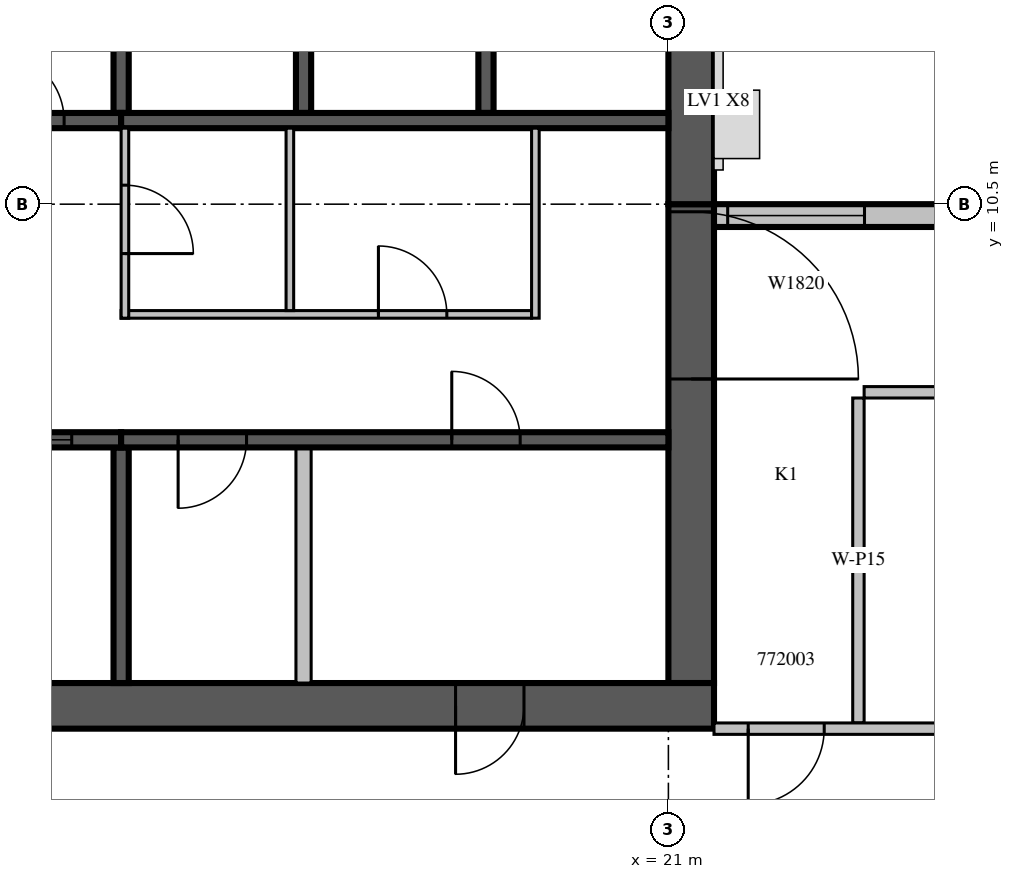
"""IFC4 building model, lengths in metres.
Left out: names, types, materials, properties, quantities, classifications, styles, units other than length and angle.
Written with IfcOpenShell. Run it as: python <this file> out.ifc"""

import sys

from ifc_helpers import new_model, si_unit, direction, frame, frame_2d, origin, place, context, subcontext, project, spatial, rectangle, extrude, source, transform, mapped, element, fill, save


model = new_model("IFC4")
c1 = context("Model", 3, precision=1e-05, world=origin(), true_north=direction((0.0, 1.0)))
c2 = subcontext(c1, "Body", "Model", "MODEL_VIEW")
j1 = project(units=[si_unit("LENGTHUNIT", "METRE"), si_unit("PLANEANGLEUNIT", "RADIAN")], contexts=[c1])
p1 = place(None, origin())
s1 = spatial("IfcSite", under=j1, at=p1, CompositionType="ELEMENT")
p2 = place(p1, origin())
s2 = spatial("IfcBuilding", under=s1, at=p2, CompositionType="ELEMENT")
p3 = place(p2, frame((0.0, 0.0, 312.5)))
s3 = spatial("IfcBuildingStorey", under=s2, at=p3, CompositionType="ELEMENT", Elevation=312.5)
m1 = source(origin(), c2, "Body", "SweptSolid", [
    extrude(rectangle(XDim=6.3, YDim=0.6, at=frame_2d((3.15, 0.0))), origin(), (0.0, 0.0, 1.0), 3.5),
])
p4 = place(p3, frame((21.3, 4.2, 0.0), z_axis=(0.0, 0.0, 1.0), x_axis=(0.0, 1.0, 0.0)))
e1 = element("IfcWall", 1, at=p4, inside=s3, PredefinedType="SHEAR", context=c2, shape_type="MappedRepresentation", body=[
    mapped(m1, transform((0.0, 0.0, 0.0), scale=1.0)),
])
m2 = source(origin(), c2, "Body", "SweptSolid", [
    extrude(rectangle(XDim=2.2, YDim=2.1, at=frame_2d((1.1, 1.05))), frame((0.0, 0.31, 0.0), z_axis=(0.0, -1.0, 0.0), x_axis=(1.0, 0.0, 0.0)), (0.0, 0.0, 1.0), 0.62),
])
p5 = place(p4, frame((4.0, 0.0, 0.0)))
e2 = element("IfcOpeningElement", 2, at=p5, cuts=e1, PredefinedType="OPENING", context=c2, shape_type="MappedRepresentation", body=[
    mapped(m2, transform((0.0, 0.0, 0.0), scale=1.0)),
])
m3 = source(origin(), c2, "Body", "SweptSolid", [
    extrude(rectangle(XDim=17.4, YDim=0.6, at=frame_2d((8.7, 0.0))), origin(), (0.0, 0.0, 1.0), 3.5),
])
p6 = place(p3, frame((4.2, 3.9, 0.0), z_axis=(0.0, 0.0, 1.0), x_axis=(1.0, 0.0, 0.0)))
e3 = element("IfcWall", 3, at=p6, inside=s3, PredefinedType="SHEAR", context=c2, shape_type="MappedRepresentation", body=[
    mapped(m3, transform((0.0, 0.0, 0.0), scale=1.0)),
])
m4 = source(origin(), c2, "Body", "SweptSolid", [
    extrude(rectangle(XDim=0.9, YDim=2.1, at=frame_2d((0.45, 1.05))), frame((0.0, 0.31, 0.0), z_axis=(0.0, -1.0, 0.0), x_axis=(1.0, 0.0, 0.0)), (0.0, 0.0, 1.0), 0.62),
])
p7 = place(p6, frame((14.0, 0.0, 0.0)))
e4 = element("IfcOpeningElement", 4, at=p7, cuts=e3, PredefinedType="OPENING", context=c2, shape_type="MappedRepresentation", body=[
    mapped(m4, transform((0.0, 0.0, 0.0), scale=1.0)),
])
m5 = source(origin(), c2, "Body", "SweptSolid", [
    extrude(rectangle(XDim=10.5, YDim=0.6, at=frame_2d((5.25, 0.0))), origin(), (0.0, 0.0, 1.0), 3.5),
])
p8 = place(p3, frame((21.3, 10.5, 0.0), z_axis=(0.0, 0.0, 1.0), x_axis=(0.0, 1.0, 0.0)))
e5 = element("IfcWall", 5, at=p8, inside=s3, PredefinedType="SHEAR", context=c2, shape_type="MappedRepresentation", body=[
    mapped(m5, transform((0.0, 0.0, 0.0), scale=1.0)),
])
m6 = source(origin(), c2, "Body", "SweptSolid", [
    extrude(rectangle(XDim=1.2, YDim=2.4, at=frame_2d((0.6, 1.2))), frame((0.0, 0.31, 0.0), z_axis=(0.0, -1.0, 0.0), x_axis=(1.0, 0.0, 0.0)), (0.0, 0.0, 1.0), 0.62),
])
p9 = place(p8, frame((5.7, 0.0, 0.6)))
e6 = element("IfcOpeningElement", 6, at=p9, cuts=e5, PredefinedType="OPENING", context=c2, shape_type="MappedRepresentation", body=[
    mapped(m6, transform((0.0, 0.0, 0.0), scale=1.0)),
])
m7 = source(origin(), c2, "Body", "SweptSolid", [
    extrude(rectangle(XDim=7.45, YDim=0.3, at=frame_2d((3.725, 0.0))), origin(), (0.0, 0.0, 1.0), 3.1),
])
p10 = place(p3, frame((29.05, 10.35, 0.0), z_axis=(0.0, 0.0, 1.0), x_axis=(-1.0, 0.0, 0.0)))
e7 = element("IfcWall", 7, at=p10, inside=s3, PredefinedType="STANDARD", context=c2, shape_type="MappedRepresentation", body=[
    mapped(m7, transform((0.0, 0.0, 0.0), scale=1.0)),
])
m8 = source(origin(), c2, "Body", "SweptSolid", [
    extrude(rectangle(XDim=3.0, YDim=2.0, at=frame_2d((1.5, 1.0))), frame((0.0, 0.16, 0.0), z_axis=(0.0, -1.0, 0.0), x_axis=(1.0, 0.0, 0.0)), (0.0, 0.0, 1.0), 0.32),
])
p11 = place(p10, frame((1.09, 0.0, 0.6)))
e8 = element("IfcOpeningElement", 8, at=p11, cuts=e7, PredefinedType="OPENING", context=c2, shape_type="MappedRepresentation", body=[
    mapped(m8, transform((0.0, 0.0, 0.0), scale=1.0)),
])
m9 = source(origin(), c2, "Body", "SweptSolid", [
    extrude(rectangle(XDim=1.8, YDim=2.0, at=frame_2d((0.9, 1.0))), frame((0.0, 0.16, 0.0), z_axis=(0.0, -1.0, 0.0), x_axis=(1.0, 0.0, 0.0)), (0.0, 0.0, 1.0), 0.32),
])
p12 = place(p10, frame((5.47, 0.0, 0.6)))
e9 = element("IfcOpeningElement", 9, at=p12, cuts=e7, PredefinedType="OPENING", context=c2, shape_type="MappedRepresentation", body=[
    mapped(m9, transform((0.0, 0.0, 0.0), scale=1.0)),
])
m10 = source(origin(), c2, "Body", "SweptSolid", [
    extrude(rectangle(XDim=3.1, YDim=0.2, at=frame_2d((1.55, 0.0))), origin(), (0.0, 0.0, 1.0), 3.1),
])
p13 = place(p3, frame((13.8, 4.2, 0.0), z_axis=(0.0, 0.0, 1.0), x_axis=(0.0, 1.0, 0.0)))
e10 = element("IfcWall", 10, at=p13, inside=s3, PredefinedType="SOLIDWALL", context=c2, shape_type="MappedRepresentation", body=[
    mapped(m10, transform((0.0, 0.0, 0.0), scale=1.0)),
])
m11 = source(origin(), c2, "Body", "SweptSolid", [
    extrude(rectangle(XDim=3.1, YDim=0.2, at=frame_2d((1.55, 0.0))), origin(), (0.0, 0.0, 1.0), 3.1),
])
p14 = place(p3, frame((16.2, 4.2, 0.0), z_axis=(0.0, 0.0, 1.0), x_axis=(0.0, 1.0, 0.0)))
e11 = element("IfcWall", 11, at=p14, inside=s3, PredefinedType="PARTITIONING", context=c2, shape_type="MappedRepresentation", body=[
    mapped(m11, transform((0.0, 0.0, 0.0), scale=1.0)),
])
m12 = source(origin(), c2, "Body", "SweptSolid", [
    extrude(rectangle(XDim=3.0, YDim=0.2, at=frame_2d((1.5, 0.0))), origin(), (0.0, 0.0, 1.0), 3.1),
])
p15 = place(p3, frame((13.8, 11.7, 0.0), z_axis=(0.0, 0.0, 1.0), x_axis=(0.0, 1.0, 0.0)))
e12 = element("IfcWall", 12, at=p15, inside=s3, PredefinedType="SOLIDWALL", context=c2, shape_type="MappedRepresentation", body=[
    mapped(m12, transform((0.0, 0.0, 0.0), scale=1.0)),
])
m13 = source(origin(), c2, "Body", "SweptSolid", [
    extrude(rectangle(XDim=3.0, YDim=0.2, at=frame_2d((1.5, 0.0))), origin(), (0.0, 0.0, 1.0), 3.5),
])
for number, where, z_axis, x_axis in (
    (13, (16.2, 11.7, 0.0), (0.0, 0.0, 1.0), (0.0, 1.0, 0.0)),
    (14, (18.6, 11.7, 0.0), (0.0, 0.0, 1.0), (0.0, 1.0, 0.0)),
):
    element("IfcWall", number, at=place(p3, frame(where, z_axis=z_axis, x_axis=x_axis)), inside=s3, PredefinedType="SOLIDWALL", context=c2, shape_type="MappedRepresentation", body=[
        mapped(m13, transform((0.0, 0.0, 0.0), scale=1.0)),
    ])
m14 = source(origin(), c2, "Body", "SweptSolid", [
    extrude(rectangle(XDim=9.6, YDim=0.2, at=frame_2d((4.8, 0.0))), origin(), (0.0, 0.0, 1.0), 3.5),
])
p16 = place(p3, frame((4.2, 7.4, 0.0), z_axis=(0.0, 0.0, 1.0), x_axis=(1.0, 0.0, 0.0)))
e15 = element("IfcWall", 15, at=p16, inside=s3, PredefinedType="SOLIDWALL", context=c2, shape_type="MappedRepresentation", body=[
    mapped(m14, transform((0.0, 0.0, 0.0), scale=1.0)),
])
m15 = source(origin(), c2, "Body", "SweptSolid", [
    extrude(rectangle(XDim=1.1, YDim=2.1, at=frame_2d((0.55, 1.05))), frame((0.0, 0.11, 0.0), z_axis=(0.0, -1.0, 0.0), x_axis=(1.0, 0.0, 0.0)), (0.0, 0.0, 1.0), 0.22),
])
p17 = place(p16, frame((0.65, 0.0, 0.0)))
e16 = element("IfcOpeningElement", 16, at=p17, cuts=e15, PredefinedType="OPENING", context=c2, shape_type="MappedRepresentation", body=[
    mapped(m15, transform((0.0, 0.0, 0.0), scale=1.0)),
])
p18 = place(p16, frame((3.05, 0.0, 0.0)))
e17 = element("IfcOpeningElement", 17, at=p18, cuts=e15, PredefinedType="OPENING", context=c2, shape_type="MappedRepresentation", body=[
    mapped(m15, transform((0.0, 0.0, 0.0), scale=1.0)),
])
p19 = place(p16, frame((5.45, 0.0, 0.0)))
e18 = element("IfcOpeningElement", 18, at=p19, cuts=e15, PredefinedType="OPENING", context=c2, shape_type="MappedRepresentation", body=[
    mapped(m15, transform((0.0, 0.0, 0.0), scale=1.0)),
])
p20 = place(p16, frame((7.85, 0.0, 0.0)))
e19 = element("IfcOpeningElement", 19, at=p20, cuts=e15, PredefinedType="OPENING", context=c2, shape_type="MappedRepresentation", body=[
    mapped(m15, transform((0.0, 0.0, 0.0), scale=1.0)),
])
m16 = source(origin(), c2, "Body", "SweptSolid", [
    extrude(rectangle(XDim=7.2, YDim=0.2, at=frame_2d((3.6, 0.0))), origin(), (0.0, 0.0, 1.0), 3.1),
])
p21 = place(p3, frame((13.8, 7.4, 0.0), z_axis=(0.0, 0.0, 1.0), x_axis=(1.0, 0.0, 0.0)))
e20 = element("IfcWall", 20, at=p21, inside=s3, PredefinedType="SOLIDWALL", context=c2, shape_type="MappedRepresentation", body=[
    mapped(m16, transform((0.0, 0.0, 0.0), scale=1.0)),
])
m17 = source(origin(), c2, "Body", "SweptSolid", [
    extrude(rectangle(XDim=0.9, YDim=2.1, at=frame_2d((0.45, 1.05))), frame((0.0, 0.11, 0.0), z_axis=(0.0, -1.0, 0.0), x_axis=(1.0, 0.0, 0.0)), (0.0, 0.0, 1.0), 0.22),
])
p22 = place(p21, frame((0.75, 0.0, 0.0)))
e21 = element("IfcOpeningElement", 21, at=p22, cuts=e20, PredefinedType="OPENING", context=c2, shape_type="MappedRepresentation", body=[
    mapped(m17, transform((0.0, 0.0, 0.0), scale=1.0)),
])
p23 = place(p21, frame((4.35, 0.0, 0.0)))
e22 = element("IfcOpeningElement", 22, at=p23, cuts=e20, PredefinedType="OPENING", context=c2, shape_type="MappedRepresentation", body=[
    mapped(m17, transform((0.0, 0.0, 0.0), scale=1.0)),
])
m18 = source(origin(), c2, "Body", "SweptSolid", [
    extrude(rectangle(XDim=4.8, YDim=0.2, at=frame_2d((2.4, 0.0))), origin(), (0.0, 0.0, 1.0), 3.1),
])
p24 = place(p3, frame((9.0, 11.6, 0.0), z_axis=(0.0, 0.0, 1.0), x_axis=(1.0, 0.0, 0.0)))
e23 = element("IfcWall", 23, at=p24, inside=s3, PredefinedType="SOLIDWALL", context=c2, shape_type="MappedRepresentation", body=[
    mapped(m18, transform((0.0, 0.0, 0.0), scale=1.0)),
])
p25 = place(p24, frame((0.75, 0.0, 0.0)))
e24 = element("IfcOpeningElement", 24, at=p25, cuts=e23, PredefinedType="OPENING", context=c2, shape_type="MappedRepresentation", body=[
    mapped(m17, transform((0.0, 0.0, 0.0), scale=1.0)),
])
p26 = place(p24, frame((3.15, 0.0, 0.0)))
e25 = element("IfcOpeningElement", 25, at=p26, cuts=e23, PredefinedType="OPENING", context=c2, shape_type="MappedRepresentation", body=[
    mapped(m17, transform((0.0, 0.0, 0.0), scale=1.0)),
])
m19 = source(origin(), c2, "Body", "SweptSolid", [
    extrude(rectangle(XDim=7.2, YDim=0.2, at=frame_2d((3.6, 0.0))), origin(), (0.0, 0.0, 1.0), 3.5),
])
p27 = place(p3, frame((13.8, 11.6, 0.0), z_axis=(0.0, 0.0, 1.0), x_axis=(1.0, 0.0, 0.0)))
e26 = element("IfcWall", 26, at=p27, inside=s3, PredefinedType="SOLIDWALL", context=c2, shape_type="MappedRepresentation", body=[
    mapped(m19, transform((0.0, 0.0, 0.0), scale=1.0)),
])
m20 = source(origin(), c2, "Body", "SweptSolid", [
    extrude(rectangle(XDim=5.4, YDim=0.1, at=frame_2d((2.7, 0.0))), origin(), (0.0, 0.0, 1.0), 3.1),
])
p28 = place(p3, frame((13.8, 9.05, 0.0), z_axis=(0.0, 0.0, 1.0), x_axis=(1.0, 0.0, 0.0)))
e27 = element("IfcWall", 27, at=p28, inside=s3, PredefinedType="PARTITIONING", context=c2, shape_type="MappedRepresentation", body=[
    mapped(m20, transform((0.0, 0.0, 0.0), scale=1.0)),
])
m21 = source(origin(), c2, "Body", "SweptSolid", [
    extrude(rectangle(XDim=0.9, YDim=2.1, at=frame_2d((0.45, 1.05))), frame((0.0, 0.06, 0.0), z_axis=(0.0, -1.0, 0.0), x_axis=(1.0, 0.0, 0.0)), (0.0, 0.0, 1.0), 0.12),
])
p29 = place(p28, frame((3.385, 0.0, 0.0)))
e28 = element("IfcOpeningElement", 28, at=p29, cuts=e27, PredefinedType="OPENING", context=c2, shape_type="MappedRepresentation", body=[
    mapped(m21, transform((0.0, 0.0, 0.0), scale=1.0)),
])
m22 = source(origin(), c2, "Body", "SweptSolid", [
    extrude(rectangle(XDim=2.5, YDim=0.1, at=frame_2d((1.25, 0.0))), origin(), (0.0, 0.0, 1.0), 3.1),
])
p30 = place(p3, frame((13.85, 9.0, 0.0), z_axis=(0.0, 0.0, 1.0), x_axis=(0.0, 1.0, 0.0)))
e29 = element("IfcWall", 29, at=p30, inside=s3, PredefinedType="PARTITIONING", context=c2, shape_type="MappedRepresentation", body=[
    mapped(m22, transform((0.0, 0.0, 0.0), scale=1.0)),
])
p31 = place(p30, frame((0.85, 0.0, 0.0)))
e30 = element("IfcOpeningElement", 30, at=p31, cuts=e29, PredefinedType="OPENING", context=c2, shape_type="MappedRepresentation", body=[
    mapped(m21, transform((0.0, 0.0, 0.0), scale=1.0)),
])
m23 = source(origin(), c2, "Body", "SweptSolid", [
    extrude(rectangle(XDim=2.4, YDim=0.1, at=frame_2d((1.2, 0.0))), origin(), (0.0, 0.0, 1.0), 3.1),
])
p32 = place(p3, frame((16.02, 9.1, 0.0), z_axis=(0.0, 0.0, 1.0), x_axis=(0.0, 1.0, 0.0)))
e31 = element("IfcWall", 31, at=p32, inside=s3, PredefinedType="PARTITIONING", context=c2, shape_type="MappedRepresentation", body=[
    mapped(m23, transform((0.0, 0.0, 0.0), scale=1.0)),
])
p33 = place(p3, frame((19.25, 9.0, 0.0), z_axis=(0.0, 0.0, 1.0), x_axis=(0.0, 1.0, 0.0)))
e32 = element("IfcWall", 32, at=p33, inside=s3, PredefinedType="PARTITIONING", context=c2, shape_type="MappedRepresentation", body=[
    mapped(m22, transform((0.0, 0.0, 0.0), scale=1.0)),
])
m24 = source(origin(), c2, "Body", "SweptSolid", [
    extrude(rectangle(XDim=4.275, YDim=0.15, at=frame_2d((2.138, 0.0))), origin(), (0.0, 0.0, 1.0), 3.1),
])
p34 = place(p3, frame((23.5, 7.95, 0.0), z_axis=(0.0, 0.0, 1.0), x_axis=(0.0, -1.0, 0.0)))
e33 = element("IfcWall", 33, at=p34, inside=s3, PredefinedType="PARTITIONING", context=c2, shape_type="MappedRepresentation", body=[
    mapped(m24, transform((0.0, 0.0, 0.0), scale=1.0)),
])
m25 = source(origin(), c2, "Body", "SweptSolid", [
    extrude(rectangle(XDim=5.75, YDim=0.15, at=frame_2d((2.875, 0.0))), origin(), (0.0, 0.0, 1.0), 3.1),
])
p35 = place(p3, frame((29.325, 8.025, 0.0), z_axis=(0.0, 0.0, 1.0), x_axis=(-1.0, 0.0, 0.0)))
e34 = element("IfcWall", 34, at=p35, inside=s3, PredefinedType="PARTITIONING", context=c2, shape_type="MappedRepresentation", body=[
    mapped(m25, transform((0.0, 0.0, 0.0), scale=1.0)),
])
m26 = source(origin(), c2, "Body", "SweptSolid", [
    extrude(rectangle(XDim=1.0, YDim=2.1, at=frame_2d((0.5, 1.05))), frame((0.0, 0.085, 0.0), z_axis=(0.0, -1.0, 0.0), x_axis=(1.0, 0.0, 0.0)), (0.0, 0.0, 1.0), 0.17),
])
p36 = place(p35, frame((2.375, 0.0, 0.0)))
e35 = element("IfcOpeningElement", 35, at=p36, cuts=e34, PredefinedType="OPENING", context=c2, shape_type="MappedRepresentation", body=[
    mapped(m26, transform((0.0, 0.0, 0.0), scale=1.0)),
])
m27 = source(origin(), c2, "Body", "SweptSolid", [
    extrude(rectangle(XDim=7.725, YDim=0.15, at=frame_2d((3.862, 0.0))), origin(), (0.0, 0.0, 1.0), 3.1),
])
p37 = place(p3, frame((21.6, 3.6, 0.0), z_axis=(0.0, 0.0, 1.0), x_axis=(1.0, 0.0, 0.0)))
e36 = element("IfcWall", 36, at=p37, inside=s3, PredefinedType="PARTITIONING", context=c2, shape_type="MappedRepresentation", body=[
    mapped(m27, transform((0.0, 0.0, 0.0), scale=1.0)),
])
p38 = place(p37, frame((0.45, 0.0, 0.0)))
e37 = element("IfcOpeningElement", 37, at=p38, cuts=e36, PredefinedType="OPENING", context=c2, shape_type="MappedRepresentation", body=[
    mapped(m26, transform((0.0, 0.0, 0.0), scale=1.0)),
])
m28 = source(origin(), c2, "Body", "SweptSolid", [
    extrude(rectangle(XDim=1.8, YDim=2.0, at=frame_2d((0.9, 1.0))), frame((0.0, 0.03, 0.0), z_axis=(0.0, -1.0, 0.0), x_axis=(1.0, 0.0, 0.0)), (0.0, 0.0, 1.0), 0.06),
])
p39 = place(p12, origin())
e38 = element("IfcWindow", 38, at=p39, inside=s3, PartitioningType="SINGLE_PANEL", PredefinedType="WINDOW", context=c2, shape_type="MappedRepresentation", body=[
    mapped(m28, transform((0.0, 0.0, 0.0), scale=1.0)),
])
fill(e9, e38)
m29 = source(origin(), c2, "Body", "SweptSolid", [
    extrude(rectangle(XDim=1.1, YDim=2.1, at=frame_2d((0.55, 1.05))), frame((0.0, 0.025, 0.0), z_axis=(0.0, -1.0, 0.0), x_axis=(1.0, 0.0, 0.0)), (0.0, 0.0, 1.0), 0.05),
])
p40 = place(p20, origin())
e39 = element("IfcDoor", 39, at=p40, inside=s3, OperationType="SLIDING_TO_LEFT", PredefinedType="DOOR", context=c2, shape_type="MappedRepresentation", body=[
    mapped(m29, transform((0.0, 0.0, 0.0), scale=1.0)),
])
fill(e19, e39)
m30 = source(origin(), c2, "Body", "SweptSolid", [
    extrude(rectangle(XDim=0.9, YDim=2.1, at=frame_2d((0.45, 1.05))), frame((0.0, 0.025, 0.0), z_axis=(0.0, -1.0, 0.0), x_axis=(1.0, 0.0, 0.0)), (0.0, 0.0, 1.0), 0.05),
])
p41 = place(p22, origin())
e40 = element("IfcDoor", 40, at=p41, inside=s3, OperationType="SINGLE_SWING_RIGHT", PredefinedType="DOOR", context=c2, shape_type="MappedRepresentation", body=[
    mapped(m30, transform((0.0, 0.0, 0.0), scale=1.0)),
])
fill(e21, e40)
p42 = place(p23, origin())
e41 = element("IfcDoor", 41, at=p42, inside=s3, OperationType="SINGLE_SWING_LEFT", PredefinedType="DOOR", context=c2, shape_type="MappedRepresentation", body=[
    mapped(m30, transform((0.0, 0.0, 0.0), scale=1.0)),
])
fill(e22, e41)
p43 = place(p26, origin())
e42 = element("IfcDoor", 42, at=p43, inside=s3, OperationType="SINGLE_SWING_LEFT", PredefinedType="DOOR", context=c2, shape_type="MappedRepresentation", body=[
    mapped(m30, transform((0.0, 0.0, 0.0), scale=1.0)),
])
fill(e25, e42)
p44 = place(p29, origin())
e43 = element("IfcDoor", 43, at=p44, inside=s3, OperationType="SINGLE_SWING_LEFT", PredefinedType="DOOR", context=c2, shape_type="MappedRepresentation", body=[
    mapped(m30, transform((0.0, 0.0, 0.0), scale=1.0)),
])
fill(e28, e43)
p45 = place(p31, origin())
e44 = element("IfcDoor", 44, at=p45, inside=s3, OperationType="SINGLE_SWING_RIGHT", PredefinedType="DOOR", context=c2, shape_type="MappedRepresentation", body=[
    mapped(m30, transform((0.0, 0.0, 0.0), scale=1.0)),
])
fill(e30, e44)
m31 = source(origin(), c2, "Body", "SweptSolid", [
    extrude(rectangle(XDim=2.2, YDim=2.1, at=frame_2d((1.1, 1.05))), frame((0.0, 0.025, 0.0), z_axis=(0.0, -1.0, 0.0), x_axis=(1.0, 0.0, 0.0)), (0.0, 0.0, 1.0), 0.05),
])
p46 = place(p5, origin())
e45 = element("IfcDoor", 45, at=p46, inside=s3, OperationType="DOUBLE_DOOR_SINGLE_SWING", PredefinedType="DOOR", context=c2, shape_type="MappedRepresentation", body=[
    mapped(m31, transform((0.0, 0.0, 0.0), scale=1.0)),
])
fill(e2, e45)
p47 = place(p7, origin())
e46 = element("IfcDoor", 46, at=p47, inside=s3, OperationType="SINGLE_SWING_RIGHT", PredefinedType="DOOR", context=c2, shape_type="MappedRepresentation", body=[
    mapped(m30, transform((0.0, 0.0, 0.0), scale=1.0)),
])
fill(e4, e46)
m32 = source(origin(), c2, "Body", "SweptSolid", [
    extrude(rectangle(XDim=1.0, YDim=2.1, at=frame_2d((0.5, 1.05))), frame((0.0, 0.025, 0.0), z_axis=(0.0, -1.0, 0.0), x_axis=(1.0, 0.0, 0.0)), (0.0, 0.0, 1.0), 0.05),
])
p48 = place(p38, origin())
e47 = element("IfcDoor", 47, at=p48, inside=s3, OperationType="SINGLE_SWING_RIGHT", PredefinedType="DOOR", context=c2, shape_type="MappedRepresentation", body=[
    mapped(m32, transform((0.0, 0.0, 0.0), scale=1.0)),
])
fill(e37, e47)
save(model, sys.argv[1])
